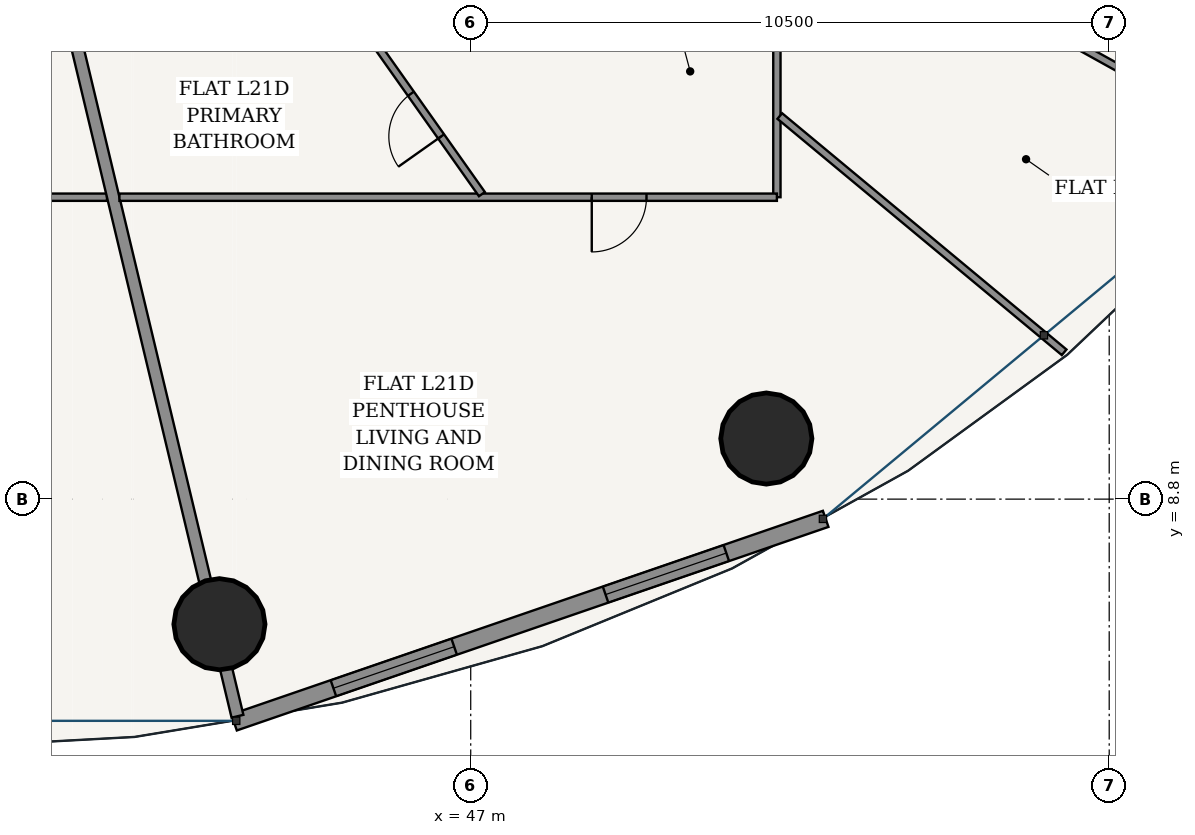
"""IFC4 building model, lengths in metres.
Left out: names, types, materials, properties, quantities, classifications, styles, units other than length and angle.
Written with IfcOpenShell. Run it as: python <this file> out.ifc"""

import sys

from ifc_helpers import new_model, si_unit, direction, frame, frame_2d, origin, origin_2d, place, context, subcontext, project, spatial, rectangle, hollow_circle, extrude, source, transform, mapped, element, fill, save


model = new_model("IFC4")
c1 = context("Model", 3, precision=1e-05, world=origin(), true_north=direction((-0.2419218956, 0.970295726276)))
c2 = subcontext(c1, "Body", "Model", "MODEL_VIEW")
j1 = project(units=[si_unit("LENGTHUNIT", "METRE"), si_unit("PLANEANGLEUNIT", "RADIAN")], contexts=[c1])
p1 = place(None, origin())
s1 = spatial("IfcSite", under=j1, at=p1, CompositionType="ELEMENT")
p2 = place(p1, origin())
s2 = spatial("IfcBuilding", under=s1, at=p2, CompositionType="ELEMENT")
p3 = place(p2, frame((0.0, 0.0, 83.4)))
s3 = spatial("IfcBuildingStorey", under=s2, at=p3, CompositionType="ELEMENT", Elevation=83.4)
for number, where, z_axis, x_axis in (
    (1, (42.867, 6.743, 0.0), (0.0, 0.0, 1.0), (1.0, 0.0, 0.0)),
    (2, (51.862, 9.796, 0.0), (0.0, 0.0, 1.0), (1.0, 0.0, 0.0)),
):
    element("IfcColumn", number, at=place(p3, frame(where, z_axis=z_axis, x_axis=x_axis)), inside=s3, PredefinedType="COLUMN", context=c2, shape_type="SweptSolid", body=[
        extrude(hollow_circle(Radius=0.75, WallThickness=0.045, at=origin_2d()), origin(), (0.0, 0.0, 1.0), 3.6),
    ])
p4 = place(p3, frame((43.108, 5.128, 0.0), z_axis=(0.0, 0.0, 1.0), x_axis=(0.945590132341, 0.325360264351, 0.0)))
e3 = element("IfcWall", 3, at=p4, inside=s3, PredefinedType="SOLIDWALL", context=c2, shape_type="SweptSolid", body=[
    extrude(rectangle(XDim=10.289, YDim=0.28, at=frame_2d((5.145, 0.0))), origin(), (0.0, 0.0, 1.0), 3.325),
])
p5 = place(p4, frame((1.728, 0.0, 0.85)))
e4 = element("IfcOpeningElement", 4, at=p5, cuts=e3, PredefinedType="OPENING", context=c2, shape_type="SweptSolid", body=[
    extrude(rectangle(XDim=2.1, YDim=1.95, at=frame_2d((1.05, 0.975))), frame((0.0, 0.15, 0.0), z_axis=(0.0, -1.0, 0.0), x_axis=(1.0, 0.0, 0.0)), (0.0, 0.0, 1.0), 0.3),
])
p6 = place(p4, frame((6.461, 0.0, 0.85)))
e5 = element("IfcOpeningElement", 5, at=p6, cuts=e3, PredefinedType="OPENING", context=c2, shape_type="SweptSolid", body=[
    extrude(rectangle(XDim=2.1, YDim=1.95, at=frame_2d((1.05, 0.975))), frame((0.0, 0.15, 0.0), z_axis=(0.0, -1.0, 0.0), x_axis=(1.0, 0.0, 0.0)), (0.0, 0.0, 1.0), 0.3),
])
p7 = place(p3, frame((41.019, 13.765, 0.0), z_axis=(0.0, 0.0, 1.0), x_axis=(-1.0, 0.0, 0.0)))
e6 = element("IfcWall", 6, at=p7, inside=s3, PredefinedType="PARTITIONING", context=c2, shape_type="SweptSolid", body=[
    extrude(rectangle(XDim=17.054, YDim=0.12, at=frame_2d((8.527, 0.0))), origin(), (0.0, 0.0, 1.0), 2.767),
])
p8 = place(p7, frame((10.933, 0.0, 0.0)))
e7 = element("IfcOpeningElement", 7, at=p8, cuts=e6, PredefinedType="OPENING", context=c2, shape_type="SweptSolid", body=[
    extrude(rectangle(XDim=0.9, YDim=2.15, at=frame_2d((0.45, 1.075))), frame((0.0, 0.07, 0.0), z_axis=(0.0, -1.0, 0.0), x_axis=(1.0, 0.0, 0.0)), (0.0, 0.0, 1.0), 0.14),
])
p9 = place(p3, frame((40.486, 16.415, 0.0), z_axis=(0.0, 0.0, 1.0), x_axis=(0.232829417917, -0.972517589636, 0.0)))
e8 = element("IfcWall", 8, at=p9, inside=s3, PredefinedType="PARTITIONING", context=c2, shape_type="SweptSolid", body=[
    extrude(rectangle(XDim=11.502, YDim=0.2, at=frame_2d((5.751, 0.0))), origin(), (0.0, 0.0, 1.0), 2.767),
])
p10 = place(p3, frame((52.035, 29.017, 0.0), z_axis=(0.0, 0.0, 1.0), x_axis=(0.0, -1.0, 0.0)))
e9 = element("IfcWall", 9, at=p10, inside=s3, PredefinedType="PARTITIONING", context=c2, shape_type="SweptSolid", body=[
    extrude(rectangle(XDim=15.252, YDim=0.12, at=frame_2d((7.626, 0.0))), origin(), (0.0, 0.0, 1.0), 2.767),
])
p11 = place(p10, frame((7.278, 0.0, 0.0)))
e10 = element("IfcOpeningElement", 10, at=p11, cuts=e9, PredefinedType="OPENING", context=c2, shape_type="SweptSolid", body=[
    extrude(rectangle(XDim=0.9, YDim=2.15, at=frame_2d((0.45, 1.075))), frame((0.0, 0.07, 0.0), z_axis=(0.0, -1.0, 0.0), x_axis=(1.0, 0.0, 0.0)), (0.0, 0.0, 1.0), 0.14),
])
p12 = place(p3, frame((52.035, 13.765, 0.0), z_axis=(0.0, 0.0, 1.0), x_axis=(-1.0, 0.0, 0.0)))
e11 = element("IfcWall", 11, at=p12, inside=s3, PredefinedType="PARTITIONING", context=c2, shape_type="SweptSolid", body=[
    extrude(rectangle(XDim=10.812, YDim=0.12, at=frame_2d((5.406, 0.0))), origin(), (0.0, 0.0, 1.0), 2.767),
])
p13 = place(p12, frame((2.145, 0.0, 0.0)))
e12 = element("IfcOpeningElement", 12, at=p13, cuts=e11, PredefinedType="OPENING", context=c2, shape_type="SweptSolid", body=[
    extrude(rectangle(XDim=0.9, YDim=2.15, at=frame_2d((0.45, 1.075))), frame((0.0, 0.07, 0.0), z_axis=(0.0, -1.0, 0.0), x_axis=(1.0, 0.0, 0.0)), (0.0, 0.0, 1.0), 0.14),
])
p14 = place(p3, frame((52.083, 15.1, 0.0), z_axis=(0.0, 0.0, 1.0), x_axis=(0.769161827891, -0.63905405289, 0.0)))
e13 = element("IfcWall", 13, at=p14, inside=s3, PredefinedType="PARTITIONING", context=c2, shape_type="SweptSolid", body=[
    extrude(rectangle(XDim=6.08, YDim=0.12, at=frame_2d((3.04, 0.0))), origin(), (0.0, 0.0, 1.0), 2.767),
])
p15 = place(p3, frame((52.089, 18.979, 0.0), z_axis=(0.0, 0.0, 1.0), x_axis=(0.874313476423, -0.485361664066, 0.0)))
e14 = element("IfcWall", 14, at=p15, inside=s3, PredefinedType="PARTITIONING", context=c2, shape_type="SweptSolid", body=[
    extrude(rectangle(XDim=9.066, YDim=0.12, at=frame_2d((4.533, 0.0))), origin(), (0.0, 0.0, 1.0), 2.767),
])
p16 = place(p15, frame((3.02, 0.0, 0.0)))
e15 = element("IfcOpeningElement", 15, at=p16, cuts=e14, PredefinedType="OPENING", context=c2, shape_type="SweptSolid", body=[
    extrude(rectangle(XDim=0.9, YDim=2.15, at=frame_2d((0.45, 1.075))), frame((0.0, 0.07, 0.0), z_axis=(0.0, -1.0, 0.0), x_axis=(1.0, 0.0, 0.0)), (0.0, 0.0, 1.0), 0.14),
])
p17 = place(p3, frame((45.345, 16.415, 0.0), z_axis=(0.0, 0.0, 1.0), x_axis=(0.577474693199, -0.816408585645, 0.0)))
e16 = element("IfcWall", 16, at=p17, inside=s3, PredefinedType="PARTITIONING", context=c2, shape_type="SweptSolid", body=[
    extrude(rectangle(XDim=3.184, YDim=0.12, at=frame_2d((1.592, 0.0))), origin(), (0.0, 0.0, 1.0), 3.004),
])
p18 = place(p17, frame((1.162, 0.0, 0.0)))
e17 = element("IfcOpeningElement", 17, at=p18, cuts=e16, PredefinedType="OPENING", context=c2, shape_type="SweptSolid", body=[
    extrude(rectangle(XDim=0.86, YDim=2.15, at=frame_2d((0.43, 1.075))), frame((0.0, 0.07, 0.0), z_axis=(0.0, -1.0, 0.0), x_axis=(1.0, 0.0, 0.0)), (0.0, 0.0, 1.0), 0.14),
])
m1 = source(origin(), c2, "Body", "SweptSolid", [
    extrude(rectangle(XDim=2.1, YDim=1.95, at=frame_2d((1.05, 0.975))), frame((0.0, 0.03, 0.0), z_axis=(0.0, -1.0, 0.0), x_axis=(1.0, 0.0, 0.0)), (0.0, 0.0, 1.0), 0.06),
])
p19 = place(p5, origin())
e18 = element("IfcWindow", 18, at=p19, inside=s3, PartitioningType="SINGLE_PANEL", PredefinedType="WINDOW", context=c2, shape_type="MappedRepresentation", body=[
    mapped(m1, transform((0.0, 0.0, 0.0), scale=1.0)),
])
fill(e4, e18)
p20 = place(p6, origin())
e19 = element("IfcWindow", 19, at=p20, inside=s3, PartitioningType="SINGLE_PANEL", PredefinedType="WINDOW", context=c2, shape_type="MappedRepresentation", body=[
    mapped(m1, transform((0.0, 0.0, 0.0), scale=1.0)),
])
fill(e5, e19)
m2 = source(origin(), c2, "Body", "SweptSolid", [
    extrude(rectangle(XDim=0.86, YDim=2.15, at=frame_2d((0.43, 1.075))), frame((0.0, 0.025, 0.0), z_axis=(0.0, -1.0, 0.0), x_axis=(1.0, 0.0, 0.0)), (0.0, 0.0, 1.0), 0.05),
])
p21 = place(p18, frame((0.86, 0.0, 0.0), z_axis=(0.0, 0.0, 1.0), x_axis=(-1.0, 0.0, 0.0)))
e20 = element("IfcDoor", 20, at=p21, inside=s3, OperationType="SINGLE_SWING_LEFT", PredefinedType="DOOR", context=c2, shape_type="MappedRepresentation", body=[
    mapped(m2, transform((0.0, 0.0, 0.0), scale=1.0)),
])
fill(e17, e20)
m3 = source(origin(), c2, "Body", "SweptSolid", [
    extrude(rectangle(XDim=0.9, YDim=2.15, at=frame_2d((0.45, 1.075))), frame((0.0, 0.025, 0.0), z_axis=(0.0, -1.0, 0.0), x_axis=(1.0, 0.0, 0.0)), (0.0, 0.0, 1.0), 0.05),
])
p22 = place(p13, origin())
e21 = element("IfcDoor", 21, at=p22, inside=s3, OperationType="SINGLE_SWING_RIGHT", PredefinedType="DOOR", context=c2, shape_type="MappedRepresentation", body=[
    mapped(m3, transform((0.0, 0.0, 0.0), scale=1.0)),
])
fill(e12, e21)
save(model, sys.argv[1])
